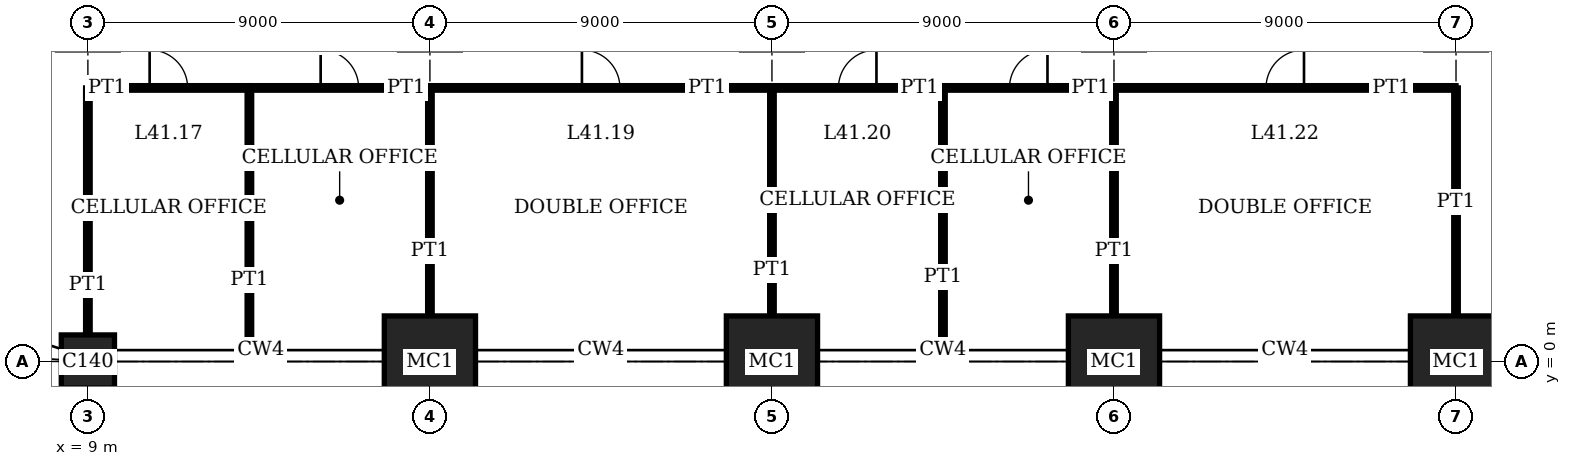
"""IFC4 building model, lengths in metres.
Left out: names, types, materials, properties, quantities, classifications, styles, units other than length and angle.
Written with IfcOpenShell. Run it as: python <this file> out.ifc"""

import sys

from ifc_helpers import new_model, si_unit, direction, frame, frame_2d, origin, origin_2d, place, context, subcontext, project, spatial, rectangle, extrude, element, fill, save


model = new_model("IFC4")
c1 = context("Model", 3, precision=1e-05, world=origin(), true_north=direction((0.0, 1.0)))
c2 = subcontext(c1, "Body", "Model", "MODEL_VIEW")
j1 = project(units=[si_unit("LENGTHUNIT", "METRE"), si_unit("PLANEANGLEUNIT", "RADIAN")], contexts=[c1])
p1 = place(None, origin())
s1 = spatial("IfcSite", under=j1, at=p1, CompositionType="ELEMENT")
p2 = place(p1, origin())
s2 = spatial("IfcBuilding", under=s1, at=p2, CompositionType="ELEMENT")
p3 = place(p2, frame((0.0, 0.0, 170.2)))
s3 = spatial("IfcBuildingStorey", under=s2, at=p3, CompositionType="ELEMENT", Elevation=170.2)
p4 = place(p3, frame((9.0, 0.0, 0.0), z_axis=(0.0, 0.0, 1.0), x_axis=(1.0, 0.0, 0.0)))
e1 = element("IfcColumn", 1, at=p4, inside=s3, PredefinedType="COLUMN", context=c2, shape_type="SweptSolid", body=[
    extrude(rectangle(XDim=1.4, YDim=1.4, at=origin_2d()), origin(), (0.0, 0.0, 1.0), 4.0),
])
for number, where, z_axis, x_axis in (
    (2, (18.0, 0.0, 0.0), (0.0, 0.0, 1.0), (1.0, 0.0, 0.0)),
    (3, (27.0, 0.0, 0.0), (0.0, 0.0, 1.0), (1.0, 0.0, 0.0)),
    (4, (36.0, 0.0, 0.0), (0.0, 0.0, 1.0), (1.0, 0.0, 0.0)),
    (5, (45.0, 0.0, 0.0), (0.0, 0.0, 1.0), (1.0, 0.0, 0.0)),
):
    element("IfcColumn", number, at=place(p3, frame(where, z_axis=z_axis, x_axis=x_axis)), inside=s3, PredefinedType="COLUMN", context=c2, shape_type="SweptSolid", body=[
        extrude(rectangle(XDim=2.4, YDim=2.4, at=origin_2d()), origin(), (0.0, 0.0, 1.0), 4.0),
    ])
p5 = place(p3, frame((9.0, 7.2, 0.0), z_axis=(0.0, 0.0, 1.0), x_axis=(1.0, 0.0, 0.0)))
e6 = element("IfcWall", 6, at=p5, inside=s3, PredefinedType="PARTITIONING", context=c2, shape_type="SweptSolid", body=[
    extrude(rectangle(XDim=4.25, YDim=0.12, at=frame_2d((2.125, 0.0))), origin(), (0.0, 0.0, 1.0), 3.75),
])
p6 = place(p5, frame((1.625, 0.0, 0.0)))
e7 = element("IfcOpeningElement", 7, at=p6, cuts=e6, PredefinedType="OPENING", context=c2, shape_type="SweptSolid", body=[
    extrude(rectangle(XDim=1.0, YDim=2.4, at=frame_2d((0.5, 1.2))), frame((0.0, 0.07, 0.0), z_axis=(0.0, -1.0, 0.0), x_axis=(1.0, 0.0, 0.0)), (0.0, 0.0, 1.0), 0.14),
])
p7 = place(p3, frame((13.25, 7.2, 0.0), z_axis=(0.0, 0.0, 1.0), x_axis=(1.0, 0.0, 0.0)))
e8 = element("IfcWall", 8, at=p7, inside=s3, PredefinedType="PARTITIONING", context=c2, shape_type="SweptSolid", body=[
    extrude(rectangle(XDim=4.75, YDim=0.12, at=frame_2d((2.375, 0.0))), origin(), (0.0, 0.0, 1.0), 3.75),
])
p8 = place(p7, frame((1.875, 0.0, 0.0)))
e9 = element("IfcOpeningElement", 9, at=p8, cuts=e8, PredefinedType="OPENING", context=c2, shape_type="SweptSolid", body=[
    extrude(rectangle(XDim=1.0, YDim=2.4, at=frame_2d((0.5, 1.2))), frame((0.0, 0.07, 0.0), z_axis=(0.0, -1.0, 0.0), x_axis=(1.0, 0.0, 0.0)), (0.0, 0.0, 1.0), 0.14),
])
p9 = place(p3, frame((18.0, 7.2, 0.0), z_axis=(0.0, 0.0, 1.0), x_axis=(1.0, 0.0, 0.0)))
e10 = element("IfcWall", 10, at=p9, inside=s3, PredefinedType="PARTITIONING", context=c2, shape_type="SweptSolid", body=[
    extrude(rectangle(XDim=9.0, YDim=0.12, at=frame_2d((4.5, 0.0))), origin(), (0.0, 0.0, 1.0), 3.75),
])
p10 = place(p9, frame((4.0, 0.0, 0.0)))
e11 = element("IfcOpeningElement", 11, at=p10, cuts=e10, PredefinedType="OPENING", context=c2, shape_type="SweptSolid", body=[
    extrude(rectangle(XDim=1.0, YDim=2.4, at=frame_2d((0.5, 1.2))), frame((0.0, 0.07, 0.0), z_axis=(0.0, -1.0, 0.0), x_axis=(1.0, 0.0, 0.0)), (0.0, 0.0, 1.0), 0.14),
])
p11 = place(p3, frame((27.0, 7.2, 0.0), z_axis=(0.0, 0.0, 1.0), x_axis=(1.0, 0.0, 0.0)))
e12 = element("IfcWall", 12, at=p11, inside=s3, PredefinedType="PARTITIONING", context=c2, shape_type="SweptSolid", body=[
    extrude(rectangle(XDim=4.5, YDim=0.12, at=frame_2d((2.25, 0.0))), origin(), (0.0, 0.0, 1.0), 3.75),
])
p12 = place(p11, frame((1.75, 0.0, 0.0)))
e13 = element("IfcOpeningElement", 13, at=p12, cuts=e12, PredefinedType="OPENING", context=c2, shape_type="SweptSolid", body=[
    extrude(rectangle(XDim=1.0, YDim=2.4, at=frame_2d((0.5, 1.2))), frame((0.0, 0.07, 0.0), z_axis=(0.0, -1.0, 0.0), x_axis=(1.0, 0.0, 0.0)), (0.0, 0.0, 1.0), 0.14),
])
p13 = place(p3, frame((31.5, 7.2, 0.0), z_axis=(0.0, 0.0, 1.0), x_axis=(1.0, 0.0, 0.0)))
e14 = element("IfcWall", 14, at=p13, inside=s3, PredefinedType="PARTITIONING", context=c2, shape_type="SweptSolid", body=[
    extrude(rectangle(XDim=4.5, YDim=0.12, at=frame_2d((2.25, 0.0))), origin(), (0.0, 0.0, 1.0), 3.75),
])
p14 = place(p13, frame((1.75, 0.0, 0.0)))
e15 = element("IfcOpeningElement", 15, at=p14, cuts=e14, PredefinedType="OPENING", context=c2, shape_type="SweptSolid", body=[
    extrude(rectangle(XDim=1.0, YDim=2.4, at=frame_2d((0.5, 1.2))), frame((0.0, 0.07, 0.0), z_axis=(0.0, -1.0, 0.0), x_axis=(1.0, 0.0, 0.0)), (0.0, 0.0, 1.0), 0.14),
])
p15 = place(p3, frame((36.0, 7.2, 0.0), z_axis=(0.0, 0.0, 1.0), x_axis=(1.0, 0.0, 0.0)))
e16 = element("IfcWall", 16, at=p15, inside=s3, PredefinedType="PARTITIONING", context=c2, shape_type="SweptSolid", body=[
    extrude(rectangle(XDim=9.0, YDim=0.12, at=frame_2d((4.5, 0.0))), origin(), (0.0, 0.0, 1.0), 3.75),
])
p16 = place(p15, frame((4.0, 0.0, 0.0)))
e17 = element("IfcOpeningElement", 17, at=p16, cuts=e16, PredefinedType="OPENING", context=c2, shape_type="SweptSolid", body=[
    extrude(rectangle(XDim=1.0, YDim=2.4, at=frame_2d((0.5, 1.2))), frame((0.0, 0.07, 0.0), z_axis=(0.0, -1.0, 0.0), x_axis=(1.0, 0.0, 0.0)), (0.0, 0.0, 1.0), 0.14),
])
p17 = place(p3, frame((9.0, 0.7, 0.0), z_axis=(0.0, 0.0, 1.0), x_axis=(0.0, 1.0, 0.0)))
e18 = element("IfcWall", 18, at=p17, inside=s3, PredefinedType="PARTITIONING", context=c2, shape_type="SweptSolid", body=[
    extrude(rectangle(XDim=6.5, YDim=0.12, at=frame_2d((3.25, 0.0))), origin(), (0.0, 0.0, 1.0), 3.05),
])
p18 = place(p3, frame((13.25, 0.31, 0.0), z_axis=(0.0, 0.0, 1.0), x_axis=(0.0, 1.0, 0.0)))
e19 = element("IfcWall", 19, at=p18, inside=s3, PredefinedType="PARTITIONING", context=c2, shape_type="SweptSolid", body=[
    extrude(rectangle(XDim=6.89, YDim=0.12, at=frame_2d((3.445, 0.0))), origin(), (0.0, 0.0, 1.0), 3.75),
])
for number, where, z_axis, x_axis in (
    (20, (18.0, 1.2, 0.0), (0.0, 0.0, 1.0), (0.0, 1.0, 0.0)),
    (21, (27.0, 1.2, 0.0), (0.0, 0.0, 1.0), (0.0, 1.0, 0.0)),
):
    element("IfcWall", number, at=place(p3, frame(where, z_axis=z_axis, x_axis=x_axis)), inside=s3, PredefinedType="PARTITIONING", context=c2, shape_type="SweptSolid", body=[
        extrude(rectangle(XDim=6.0, YDim=0.12, at=frame_2d((3.0, 0.0))), origin(), (0.0, 0.0, 1.0), 3.05),
    ])
p19 = place(p3, frame((31.5, 0.31, 0.0), z_axis=(0.0, 0.0, 1.0), x_axis=(0.0, 1.0, 0.0)))
e22 = element("IfcWall", 22, at=p19, inside=s3, PredefinedType="PARTITIONING", context=c2, shape_type="SweptSolid", body=[
    extrude(rectangle(XDim=6.89, YDim=0.12, at=frame_2d((3.445, 0.0))), origin(), (0.0, 0.0, 1.0), 3.75),
])
for number, where, z_axis, x_axis in (
    (23, (36.0, 1.2, 0.0), (0.0, 0.0, 1.0), (0.0, 1.0, 0.0)),
    (24, (45.0, 1.2, 0.0), (0.0, 0.0, 1.0), (0.0, 1.0, 0.0)),
):
    element("IfcWall", number, at=place(p3, frame(where, z_axis=z_axis, x_axis=x_axis)), inside=s3, PredefinedType="PARTITIONING", context=c2, shape_type="SweptSolid", body=[
        extrude(rectangle(XDim=6.0, YDim=0.12, at=frame_2d((3.0, 0.0))), origin(), (0.0, 0.0, 1.0), 3.05),
    ])
p20 = place(p6, origin())
e25 = element("IfcDoor", 25, at=p20, inside=s3, OperationType="SINGLE_SWING_RIGHT", PredefinedType="DOOR", context=c2, shape_type="SweptSolid", body=[
    extrude(rectangle(XDim=1.0, YDim=2.4, at=frame_2d((0.5, 1.2))), frame((0.0, 0.025, 0.0), z_axis=(0.0, -1.0, 0.0), x_axis=(1.0, 0.0, 0.0)), (0.0, 0.0, 1.0), 0.05),
])
fill(e7, e25)
p21 = place(p8, origin())
e26 = element("IfcDoor", 26, at=p21, inside=s3, OperationType="SINGLE_SWING_RIGHT", PredefinedType="DOOR", context=c2, shape_type="SweptSolid", body=[
    extrude(rectangle(XDim=1.0, YDim=2.4, at=frame_2d((0.5, 1.2))), frame((0.0, 0.025, 0.0), z_axis=(0.0, -1.0, 0.0), x_axis=(1.0, 0.0, 0.0)), (0.0, 0.0, 1.0), 0.05),
])
fill(e9, e26)
p22 = place(p10, origin())
e27 = element("IfcDoor", 27, at=p22, inside=s3, OperationType="SINGLE_SWING_RIGHT", PredefinedType="DOOR", context=c2, shape_type="SweptSolid", body=[
    extrude(rectangle(XDim=1.0, YDim=2.4, at=frame_2d((0.5, 1.2))), frame((0.0, 0.025, 0.0), z_axis=(0.0, -1.0, 0.0), x_axis=(1.0, 0.0, 0.0)), (0.0, 0.0, 1.0), 0.05),
])
fill(e11, e27)
p23 = place(p12, origin())
e28 = element("IfcDoor", 28, at=p23, inside=s3, OperationType="SINGLE_SWING_LEFT", PredefinedType="DOOR", context=c2, shape_type="SweptSolid", body=[
    extrude(rectangle(XDim=1.0, YDim=2.4, at=frame_2d((0.5, 1.2))), frame((0.0, 0.025, 0.0), z_axis=(0.0, -1.0, 0.0), x_axis=(1.0, 0.0, 0.0)), (0.0, 0.0, 1.0), 0.05),
])
fill(e13, e28)
p24 = place(p14, origin())
e29 = element("IfcDoor", 29, at=p24, inside=s3, OperationType="SINGLE_SWING_LEFT", PredefinedType="DOOR", context=c2, shape_type="SweptSolid", body=[
    extrude(rectangle(XDim=1.0, YDim=2.4, at=frame_2d((0.5, 1.2))), frame((0.0, 0.025, 0.0), z_axis=(0.0, -1.0, 0.0), x_axis=(1.0, 0.0, 0.0)), (0.0, 0.0, 1.0), 0.05),
])
fill(e15, e29)
p25 = place(p16, origin())
e30 = element("IfcDoor", 30, at=p25, inside=s3, OperationType="SINGLE_SWING_LEFT", PredefinedType="DOOR", context=c2, shape_type="SweptSolid", body=[
    extrude(rectangle(XDim=1.0, YDim=2.4, at=frame_2d((0.5, 1.2))), frame((0.0, 0.025, 0.0), z_axis=(0.0, -1.0, 0.0), x_axis=(1.0, 0.0, 0.0)), (0.0, 0.0, 1.0), 0.05),
])
fill(e17, e30)
save(model, sys.argv[1])
